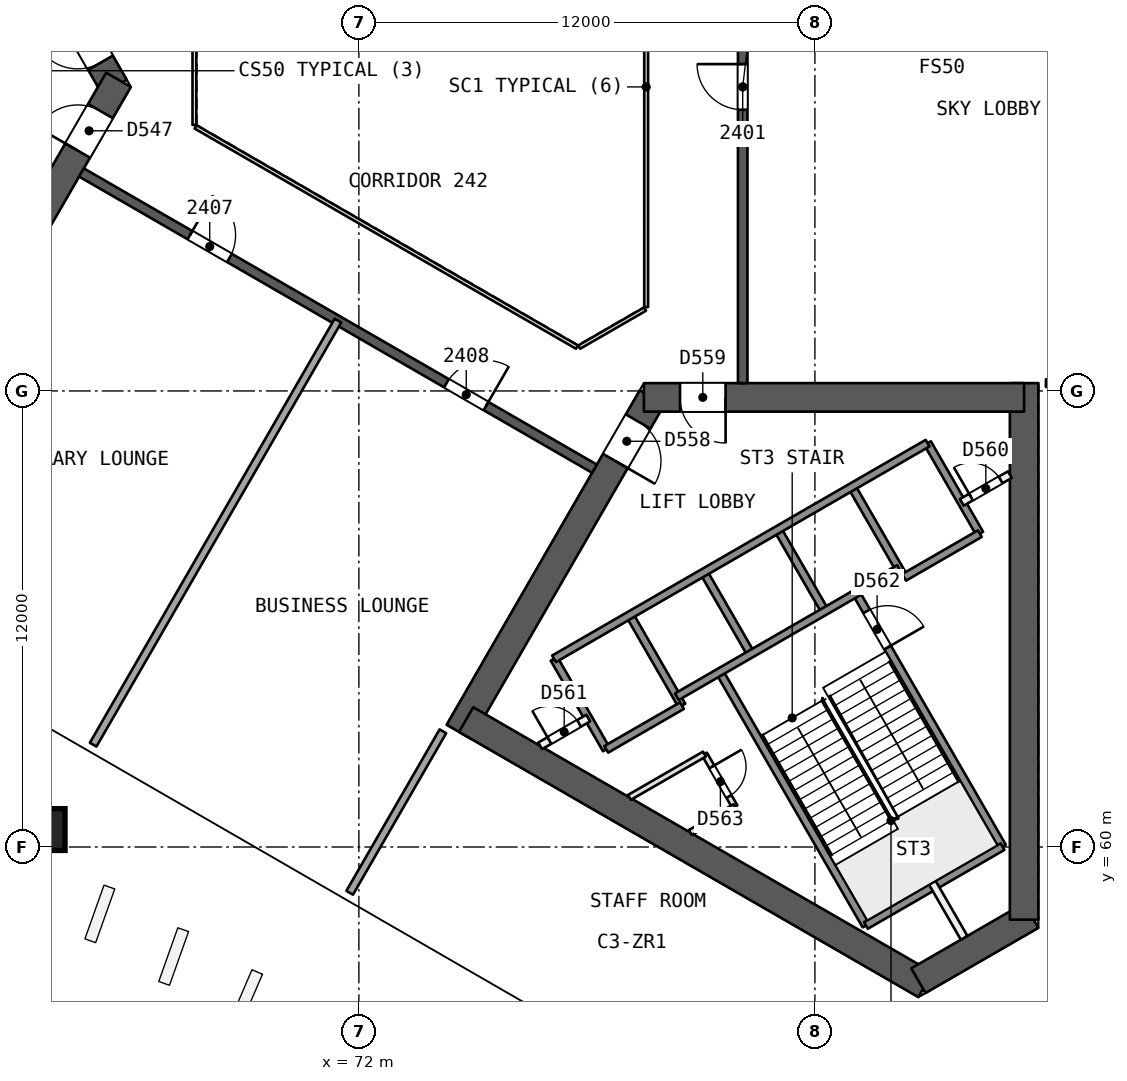
"""IFC4 building model, lengths in metres.
Left out: names, types, materials, properties, quantities, classifications, styles, units other than length and angle.
Written with IfcOpenShell. Run it as: python <this file> out.ifc"""

import sys

from ifc_helpers import new_model, si_unit, direction, frame, frame_2d, origin, origin_2d, place, context, subcontext, project, spatial, rectangle, extrude, element, fill, save


model = new_model("IFC4")
c1 = context("Model", 3, precision=1e-05, world=origin(), true_north=direction((0.0, 1.0)))
c2 = subcontext(c1, "Body", "Model", "MODEL_VIEW")
j1 = project(units=[si_unit("LENGTHUNIT", "METRE"), si_unit("PLANEANGLEUNIT", "RADIAN")], contexts=[c1])
p1 = place(None, origin())
s1 = spatial("IfcSite", under=j1, at=p1, CompositionType="ELEMENT")
p2 = place(p1, origin())
s2 = spatial("IfcBuilding", under=s1, at=p2, CompositionType="ELEMENT")
p3 = place(p2, frame((0.0, 0.0, 102.4)))
s3 = spatial("IfcBuildingStorey", under=s2, at=p3, CompositionType="ELEMENT", Elevation=102.4)
p4 = place(p3, frame((65.567, 80.0, 0.0), z_axis=(0.0, 0.0, 1.0), x_axis=(-0.499988615364, 0.866031976607, 0.0)))
e1 = element("IfcWall", 1, at=p4, inside=s3, PredefinedType="SHEAR", context=c2, shape_type="SweptSolid", body=[
    extrude(rectangle(XDim=10.163, YDim=0.75, at=frame_2d((5.082, 0.0))), origin(), (0.0, 0.0, 1.0), 4.4),
])
p5 = place(p4, frame((0.733, 0.0, 0.0)))
e2 = element("IfcOpeningElement", 2, at=p5, cuts=e1, PredefinedType="OPENING", context=c2, shape_type="SweptSolid", body=[
    extrude(rectangle(XDim=1.2, YDim=2.1, at=frame_2d((0.6, 1.05))), frame((0.0, 0.385, 0.0), z_axis=(0.0, -1.0, 0.0), x_axis=(1.0, 0.0, 0.0)), (0.0, 0.0, 1.0), 0.771),
])
p6 = place(p3, frame((60.673, 71.523, 0.0), z_axis=(0.0, 0.0, 1.0), x_axis=(0.499997052475, 0.866027105532, 0.0)))
e3 = element("IfcWall", 3, at=p6, inside=s3, PredefinedType="SHEAR", context=c2, shape_type="SweptSolid", body=[
    extrude(rectangle(XDim=10.005, YDim=0.75, at=frame_2d((5.002, 0.0))), origin(), (0.0, 0.0, 1.0), 4.4),
])
p7 = place(p6, frame((7.855, 0.0, 0.0)))
e4 = element("IfcOpeningElement", 4, at=p7, cuts=e3, PredefinedType="OPENING", context=c2, shape_type="SweptSolid", body=[
    extrude(rectangle(XDim=1.2, YDim=2.1, at=frame_2d((0.6, 1.05))), frame((0.0, 0.385, 0.0), z_axis=(0.0, -1.0, 0.0), x_axis=(1.0, 0.0, 0.0)), (0.0, 0.0, 1.0), 0.771),
])
p8 = place(p3, frame((79.717, 71.831, 0.0), z_axis=(0.0, 0.0, 1.0), x_axis=(-0.499996230114, -0.866027580318, 0.0)))
e5 = element("IfcWall", 5, at=p8, inside=s3, PredefinedType="SHEAR", context=c2, shape_type="SweptSolid", body=[
    extrude(rectangle(XDim=10.164, YDim=0.75, at=frame_2d((5.082, 0.0))), origin(), (0.0, 0.0, 1.0), 4.4),
])
p9 = place(p8, frame((0.733, 0.0, 0.0)))
e6 = element("IfcOpeningElement", 6, at=p9, cuts=e5, PredefinedType="OPENING", context=c2, shape_type="SweptSolid", body=[
    extrude(rectangle(XDim=1.2, YDim=2.1, at=frame_2d((0.6, 1.05))), frame((0.0, 0.385, 0.0), z_axis=(0.0, -1.0, 0.0), x_axis=(1.0, 0.0, 0.0)), (0.0, 0.0, 1.0), 0.771),
])
p10 = place(p3, frame((74.822, 63.354, 0.0), z_axis=(0.0, 0.0, 1.0), x_axis=(0.8660248072, -0.500001033313, 0.0)))
e7 = element("IfcWall", 7, at=p10, inside=s3, PredefinedType="SHEAR", context=c2, shape_type="SweptSolid", body=[
    extrude(rectangle(XDim=13.958, YDim=0.75, at=frame_2d((6.979, 0.0))), origin(), (0.0, 0.0, 1.0), 4.4),
])
p11 = place(p3, frame((86.723, 56.483, 0.0), z_axis=(0.0, 0.0, 1.0), x_axis=(0.866017201164, 0.500014207086, 0.0)))
e8 = element("IfcWall", 8, at=p11, inside=s3, PredefinedType="SHEAR", context=c2, shape_type="SweptSolid", body=[
    extrude(rectangle(XDim=3.429, YDim=0.75, at=frame_2d((1.714, 0.0))), origin(), (0.0, 0.0, 1.0), 4.4),
])
p12 = place(p3, frame((89.505, 58.089, 0.0), z_axis=(0.0, 0.0, 1.0), x_axis=(0.0, 1.0, 0.0)))
e9 = element("IfcWall", 9, at=p12, inside=s3, PredefinedType="SHEAR", context=c2, shape_type="SweptSolid", body=[
    extrude(rectangle(XDim=14.117, YDim=0.75, at=frame_2d((7.059, 0.0))), origin(), (0.0, 0.0, 1.0), 4.4),
])
p13 = place(p3, frame((89.505, 71.831, 0.0), z_axis=(0.0, 0.0, 1.0), x_axis=(-1.0, 0.0, 0.0)))
e10 = element("IfcWall", 10, at=p13, inside=s3, PredefinedType="SHEAR", context=c2, shape_type="SweptSolid", body=[
    extrude(rectangle(XDim=10.005, YDim=0.75, at=frame_2d((5.002, 0.0))), origin(), (0.0, 0.0, 1.0), 4.4),
])
p14 = place(p13, frame((7.855, 0.0, 0.0)))
e11 = element("IfcOpeningElement", 11, at=p14, cuts=e10, PredefinedType="OPENING", context=c2, shape_type="SweptSolid", body=[
    extrude(rectangle(XDim=1.2, YDim=2.1, at=frame_2d((0.6, 1.05))), frame((0.0, 0.385, 0.0), z_axis=(0.0, -1.0, 0.0), x_axis=(1.0, 0.0, 0.0)), (0.0, 0.0, 1.0), 0.771),
])
p15 = place(p3, frame((82.1, 72.206, 0.0), z_axis=(0.0, 0.0, 1.0), x_axis=(0.0, 1.0, 0.0)))
e12 = element("IfcWall", 12, at=p15, inside=s3, PredefinedType="SHEAR", context=c2, shape_type="SweptSolid", body=[
    extrude(rectangle(XDim=15.588, YDim=0.25, at=frame_2d((7.794, 0.0))), origin(), (0.0, 0.0, 1.0), 3.95),
])
p16 = place(p15, frame((7.194, 0.0, 0.0)))
e13 = element("IfcOpeningElement", 13, at=p16, cuts=e12, PredefinedType="OPENING", context=c2, shape_type="SweptSolid", body=[
    extrude(rectangle(XDim=1.2, YDim=2.4, at=frame_2d((0.6, 1.2))), frame((0.0, 0.135, 0.0), z_axis=(0.0, -1.0, 0.0), x_axis=(1.0, 0.0, 0.0)), (0.0, 0.0, 1.0), 0.271),
])
p17 = place(p3, frame((64.7, 77.748, 0.0), z_axis=(0.0, 0.0, 1.0), x_axis=(0.866026492143, -0.499998114903, 0.0)))
e14 = element("IfcWall", 14, at=p17, inside=s3, PredefinedType="SHEAR", context=c2, shape_type="SweptSolid", body=[
    extrude(rectangle(XDim=15.588, YDim=0.25, at=frame_2d((7.794, 0.0))), origin(), (0.0, 0.0, 1.0), 3.95),
])
p18 = place(p17, frame((3.297, 0.0, 0.0)))
e15 = element("IfcOpeningElement", 15, at=p18, cuts=e14, PredefinedType="OPENING", context=c2, shape_type="SweptSolid", body=[
    extrude(rectangle(XDim=1.2, YDim=2.4, at=frame_2d((0.6, 1.2))), frame((0.0, 0.135, 0.0), z_axis=(0.0, -1.0, 0.0), x_axis=(1.0, 0.0, 0.0)), (0.0, 0.0, 1.0), 0.271),
])
p19 = place(p17, frame((11.091, 0.0, 0.0)))
e16 = element("IfcOpeningElement", 16, at=p19, cuts=e14, PredefinedType="OPENING", context=c2, shape_type="SweptSolid", body=[
    extrude(rectangle(XDim=1.2, YDim=2.4, at=frame_2d((0.6, 1.2))), frame((0.0, 0.135, 0.0), z_axis=(0.0, -1.0, 0.0), x_axis=(1.0, 0.0, 0.0)), (0.0, 0.0, 1.0), 0.271),
])
p20 = place(p3, frame((63.706, 60.438, 0.0), z_axis=(0.010096151254, 0.017474107939, 0.999796340902), x_axis=(-0.500176845205, -0.865688077082, 0.020181098047)))
e17 = element("IfcColumn", 17, at=p20, inside=s3, PredefinedType="COLUMN", context=c2, shape_type="SweptSolid", body=[
    extrude(rectangle(XDim=1.1, YDim=1.1, at=origin_2d()), origin(), (0.0, 0.0, 1.0), 4.401),
])
p21 = place(p3, frame((94.984, 72.206, 0.0), z_axis=(0.0, 0.0, 1.0), x_axis=(-1.0, 0.0, 0.0)))
e18 = element("IfcWall", 18, at=p21, inside=s3, PredefinedType="PARTITIONING", context=c2, shape_type="SweptSolid", body=[
    extrude(rectangle(XDim=4.905, YDim=0.2, at=frame_2d((2.453, 0.0))), origin(), (0.0, 0.0, 1.0), 3.95),
])
p22 = place(p21, frame((1.9, 0.0, 0.0)))
e19 = element("IfcOpeningElement", 19, at=p22, cuts=e18, PredefinedType="OPENING", context=c2, shape_type="SweptSolid", body=[
    extrude(rectangle(XDim=1.2, YDim=2.4, at=frame_2d((0.6, 1.2))), frame((0.0, 0.11, 0.0), z_axis=(0.0, -1.0, 0.0), x_axis=(1.0, 0.0, 0.0)), (0.0, 0.0, 1.0), 0.221),
])
p23 = place(p3, frame((65.008, 62.693, 0.0), z_axis=(0.0, 0.0, 1.0), x_axis=(0.499996920331, 0.866027181825, 0.0)))
e20 = element("IfcWall", 20, at=p23, inside=s3, PredefinedType="PARTITIONING", context=c2, shape_type="SweptSolid", body=[
    extrude(rectangle(XDim=12.884, YDim=0.2, at=frame_2d((6.442, 0.0))), origin(), (0.0, 0.0, 1.0), 3.95),
])
p24 = place(p3, frame((74.21, 63.044, 0.0), z_axis=(0.0, 0.0, 1.0), x_axis=(-0.499982380289, -0.86603557629, 0.0)))
e21 = element("IfcWall", 21, at=p24, inside=s3, PredefinedType="PARTITIONING", context=c2, shape_type="SweptSolid", body=[
    extrude(rectangle(XDim=4.906, YDim=0.2, at=frame_2d((2.453, 0.0))), origin(), (0.0, 0.0, 1.0), 3.95),
])
p25 = place(p3, frame((77.135, 64.952, 0.0), z_axis=(0.0, 0.0, 1.0), x_axis=(0.499996545922, -0.866027397988, 0.0)))
e22 = element("IfcWall", 22, at=p25, inside=s3, PredefinedType="SOLIDWALL", context=c2, shape_type="SweptSolid", body=[
    extrude(rectangle(XDim=2.75, YDim=0.2, at=frame_2d((1.375, 0.0))), origin(), (0.0, 0.0, 1.0), 3.95),
])
p26 = place(p3, frame((81.094, 62.445, 0.0), z_axis=(0.0, 0.0, 1.0), x_axis=(0.499880961361, -0.866094119867, 0.0)))
e23 = element("IfcWall", 23, at=p26, inside=s3, PredefinedType="PARTITIONING", context=c2, shape_type="SweptSolid", body=[
    extrude(rectangle(XDim=1.6, YDim=0.15, at=frame_2d((0.8, 0.0))), origin(), (0.0, 0.0, 1.0), 3.95),
])
p27 = place(p26, frame((0.387, 0.0, 0.0)))
e24 = element("IfcOpeningElement", 24, at=p27, cuts=e23, PredefinedType="OPENING", context=c2, shape_type="SweptSolid", body=[
    extrude(rectangle(XDim=0.9, YDim=2.1, at=frame_2d((0.45, 1.05))), frame((0.0, 0.085, 0.0), z_axis=(0.0, -1.0, 0.0), x_axis=(1.0, 0.0, 0.0)), (0.0, 0.0, 1.0), 0.171),
])
p28 = place(p3, frame((79.127, 66.102, 0.0), z_axis=(0.0, 0.0, 1.0), x_axis=(0.499996545922, -0.866027397988, 0.0)))
e25 = element("IfcWall", 25, at=p28, inside=s3, PredefinedType="SOLIDWALL", context=c2, shape_type="SweptSolid", body=[
    extrude(rectangle(XDim=2.75, YDim=0.2, at=frame_2d((1.375, 0.0))), origin(), (0.0, 0.0, 1.0), 3.95),
])
p29 = place(p3, frame((81.493, 64.604, 0.0), z_axis=(0.0, 0.0, 1.0), x_axis=(0.500006057782, -0.866021906294, 0.0)))
e26 = element("IfcWall", 26, at=p29, inside=s3, PredefinedType="SOLIDWALL", context=c2, shape_type="SweptSolid", body=[
    extrude(rectangle(XDim=7.7, YDim=0.2, at=frame_2d((3.85, 0.0))), origin(), (0.0, 0.0, 1.0), 3.95),
])
p30 = place(p3, frame((81.076, 67.227, 0.0), z_axis=(0.0, 0.0, 1.0), x_axis=(0.50000366821, -0.866023285932, 0.0)))
e27 = element("IfcWall", 27, at=p30, inside=s3, PredefinedType="SOLIDWALL", context=c2, shape_type="SweptSolid", body=[
    extrude(rectangle(XDim=2.48, YDim=0.2, at=frame_2d((1.24, 0.0))), origin(), (0.0, 0.0, 1.0), 3.95),
])
p31 = place(p3, frame((87.09, 59.06, 0.0), z_axis=(0.0, 0.0, 1.0), x_axis=(0.499937194881, -0.866061661301, 0.0)))
e28 = element("IfcWall", 28, at=p31, inside=s3, PredefinedType="PARTITIONING", context=c2, shape_type="SweptSolid", body=[
    extrude(rectangle(XDim=1.673, YDim=0.2, at=frame_2d((0.836, 0.0))), origin(), (0.0, 0.0, 1.0), 3.95),
])
p32 = place(p3, frame((83.024, 68.352, 0.0), z_axis=(0.0, 0.0, 1.0), x_axis=(0.50000366821, -0.866023285932, 0.0)))
e29 = element("IfcWall", 29, at=p32, inside=s3, PredefinedType="SOLIDWALL", context=c2, shape_type="SweptSolid", body=[
    extrude(rectangle(XDim=2.48, YDim=0.2, at=frame_2d((1.24, 0.0))), origin(), (0.0, 0.0, 1.0), 3.95),
])
p33 = place(p3, frame((85.087, 66.679, 0.0), z_axis=(0.0, 0.0, 1.0), x_axis=(0.500019787375, -0.866013979237, 0.0)))
e30 = element("IfcWall", 30, at=p33, inside=s3, PredefinedType="SOLIDWALL", context=c2, shape_type="SweptSolid", body=[
    extrude(rectangle(XDim=7.7, YDim=0.2, at=frame_2d((3.85, 0.0))), origin(), (0.0, 0.0, 1.0), 3.95),
])
p34 = place(p33, frame((0.55, 0.0, 0.0)))
e31 = element("IfcOpeningElement", 31, at=p34, cuts=e30, PredefinedType="OPENING", context=c2, shape_type="SweptSolid", body=[
    extrude(rectangle(XDim=1.1, YDim=2.1, at=frame_2d((0.55, 1.05))), frame((0.0, 0.11, 0.0), z_axis=(0.0, -1.0, 0.0), x_axis=(1.0, 0.0, 0.0)), (0.0, 0.0, 1.0), 0.221),
])
for number, where, z_axis, x_axis in (
    (32, (84.973, 69.477, 0.0), (0.0, 0.0, 1.0), (0.5, -0.866, 0.0)),
    (33, (86.965, 70.626, 0.0), (0.0, 0.0, 1.0), (0.5, -0.866, 0.0)),
):
    element("IfcWall", number, at=place(p3, frame(where, z_axis=z_axis, x_axis=x_axis)), inside=s3, PredefinedType="SOLIDWALL", context=c2, shape_type="SweptSolid", body=[
        extrude(rectangle(XDim=2.75, YDim=0.2, at=frame_2d((1.375, 0.0))), origin(), (0.0, 0.0, 1.0), 3.95),
    ])
p35 = place(p3, frame((77.135, 64.952, 0.0), z_axis=(0.0, 0.0, 1.0), x_axis=(0.866031916153, 0.499988720078, 0.0)))
e34 = element("IfcWall", 34, at=p35, inside=s3, PredefinedType="SOLIDWALL", context=c2, shape_type="SweptSolid", body=[
    extrude(rectangle(XDim=11.35, YDim=0.2, at=frame_2d((5.675, 0.0))), origin(), (0.0, 0.0, 1.0), 3.95),
])
p36 = place(p3, frame((76.77, 62.662, 0.0), z_axis=(0.0, 0.0, 1.0), x_axis=(0.866054810376, 0.49994906283, 0.0)))
e35 = element("IfcWall", 35, at=p36, inside=s3, PredefinedType="PARTITIONING", context=c2, shape_type="SweptSolid", body=[
    extrude(rectangle(XDim=1.461, YDim=0.2, at=frame_2d((0.73, 0.0))), origin(), (0.0, 0.0, 1.0), 3.95),
])
p37 = place(p36, frame((0.281, 0.0, 0.0)))
e36 = element("IfcOpeningElement", 36, at=p37, cuts=e35, PredefinedType="OPENING", context=c2, shape_type="SweptSolid", body=[
    extrude(rectangle(XDim=0.9, YDim=2.1, at=frame_2d((0.45, 1.05))), frame((0.0, 0.11, 0.0), z_axis=(0.0, -1.0, 0.0), x_axis=(1.0, 0.0, 0.0)), (0.0, 0.0, 1.0), 0.221),
])
p38 = place(p3, frame((87.865, 69.068, 0.0), z_axis=(0.0, 0.0, 1.0), x_axis=(0.865982457891, 0.500074377092, 0.0)))
e37 = element("IfcWall", 37, at=p38, inside=s3, PredefinedType="PARTITIONING", context=c2, shape_type="SweptSolid", body=[
    extrude(rectangle(XDim=1.461, YDim=0.2, at=frame_2d((0.73, 0.0))), origin(), (0.0, 0.0, 1.0), 3.95),
])
p39 = place(p38, frame((0.281, 0.0, 0.0)))
e38 = element("IfcOpeningElement", 38, at=p39, cuts=e37, PredefinedType="OPENING", context=c2, shape_type="SweptSolid", body=[
    extrude(rectangle(XDim=0.9, YDim=2.1, at=frame_2d((0.45, 1.05))), frame((0.0, 0.11, 0.0), z_axis=(0.0, -1.0, 0.0), x_axis=(1.0, 0.0, 0.0)), (0.0, 0.0, 1.0), 0.221),
])
p40 = place(p3, frame((80.367, 63.954, 0.0), z_axis=(0.0, 0.0, 1.0), x_axis=(0.866026575979, 0.499997969693, 0.0)))
e39 = element("IfcWall", 39, at=p40, inside=s3, PredefinedType="SOLIDWALL", context=c2, shape_type="SweptSolid", body=[
    extrude(rectangle(XDim=6.75, YDim=0.2, at=frame_2d((3.375, 0.0))), origin(), (0.0, 0.0, 1.0), 3.95),
])
p41 = place(p3, frame((78.51, 62.57, 0.0), z_axis=(0.0, 0.0, 1.0), x_axis=(0.866053019151, 0.499952165731, 0.0)))
e40 = element("IfcWall", 40, at=p41, inside=s3, PredefinedType="SOLIDWALL", context=c2, shape_type="SweptSolid", body=[
    extrude(rectangle(XDim=2.3, YDim=0.2, at=frame_2d((1.15, 0.0))), origin(), (0.0, 0.0, 1.0), 3.95),
])
p42 = place(p3, frame((86.348, 67.095, 0.0), z_axis=(0.0, 0.0, 1.0), x_axis=(0.86602648383, 0.499998129301, 0.0)))
e41 = element("IfcWall", 41, at=p42, inside=s3, PredefinedType="SOLIDWALL", context=c2, shape_type="SweptSolid", body=[
    extrude(rectangle(XDim=2.3, YDim=0.2, at=frame_2d((1.15, 0.0))), origin(), (0.0, 0.0, 1.0), 3.95),
])
p43 = place(p3, frame((79.12, 61.305, 0.0), z_axis=(0.0, 0.0, 1.0), x_axis=(0.866046471269, 0.499963508271, 0.0)))
e42 = element("IfcWall", 42, at=p43, inside=s3, PredefinedType="PARTITIONING", context=c2, shape_type="SweptSolid", body=[
    extrude(rectangle(XDim=2.28, YDim=0.15, at=frame_2d((1.14, 0.0))), origin(), (0.0, 0.0, 1.0), 3.95),
])
p44 = place(p3, frame((80.72, 60.382, 0.0), z_axis=(0.0, 0.0, 1.0), x_axis=(0.866017611601, 0.500013496215, 0.0)))
e43 = element("IfcWall", 43, at=p44, inside=s3, PredefinedType="PARTITIONING", context=c2, shape_type="SweptSolid", body=[
    extrude(rectangle(XDim=1.355, YDim=0.15, at=frame_2d((0.678, 0.0))), origin(), (0.0, 0.0, 1.0), 3.95),
])
p45 = place(p3, frame((85.343, 57.935, 0.0), z_axis=(0.0, 0.0, 1.0), x_axis=(0.866004344652, 0.500036473714, 0.0)))
e44 = element("IfcWall", 44, at=p45, inside=s3, PredefinedType="SOLIDWALL", context=c2, shape_type="SweptSolid", body=[
    extrude(rectangle(XDim=4.15, YDim=0.2, at=frame_2d((2.075, 0.0))), origin(), (0.0, 0.0, 1.0), 3.95),
])
p46 = place(p3, frame((79.56, 74.206, 0.0), z_axis=(0.0, 0.0, 1.0), x_axis=(0.0, 1.0, 0.0)))
e45 = element("IfcWall", 45, at=p46, inside=s3, PredefinedType="PARTITIONING", context=c2, shape_type="SweptSolid", body=[
    extrude(rectangle(XDim=11.588, YDim=0.1, at=frame_2d((5.794, 0.0))), origin(), (0.0, 0.0, 1.0), 3.95),
])
p47 = place(p3, frame((67.672, 81.0, 0.0), z_axis=(0.0, 0.0, 1.0), x_axis=(0.0, -1.0, 0.0)))
e46 = element("IfcWall", 46, at=p47, inside=s3, PredefinedType="PARTITIONING", context=c2, shape_type="SweptSolid", body=[
    extrude(rectangle(XDim=2.0, YDim=0.1, at=frame_2d((1.0, 0.0))), origin(), (0.0, 0.0, 1.0), 3.95),
])
p48 = place(p3, frame((67.702, 78.948, 0.0), z_axis=(0.0, 0.0, 1.0), x_axis=(0.866026658274, -0.499997827154, 0.0)))
e47 = element("IfcWall", 47, at=p48, inside=s3, PredefinedType="PARTITIONING", context=c2, shape_type="SweptSolid", body=[
    extrude(rectangle(XDim=11.588, YDim=0.1, at=frame_2d((5.794, 0.0))), origin(), (0.0, 0.0, 1.0), 3.95),
])
p49 = place(p3, frame((77.798, 73.154, 0.0), z_axis=(0.0, 0.0, 1.0), x_axis=(0.866041268327, 0.499972520799, 0.0)))
e48 = element("IfcWall", 48, at=p49, inside=s3, PredefinedType="PARTITIONING", context=c2, shape_type="SweptSolid", body=[
    extrude(rectangle(XDim=2.0, YDim=0.1, at=frame_2d((1.0, 0.0))), origin(), (0.0, 0.0, 1.0), 3.95),
])
p50 = place(p16, origin())
e49 = element("IfcDoor", 49, at=p50, inside=s3, OperationType="SINGLE_SWING_RIGHT", PredefinedType="NOTDEFINED", context=c2, shape_type="SweptSolid", body=[
    extrude(rectangle(XDim=1.2, YDim=2.4, at=frame_2d((0.6, 1.2))), frame((0.0, 0.025, 0.0), z_axis=(0.0, -1.0, 0.0), x_axis=(1.0, 0.0, 0.0)), (0.0, 0.0, 1.0), 0.05),
])
fill(e13, e49)
p51 = place(p18, origin())
e50 = element("IfcDoor", 50, at=p51, inside=s3, OperationType="SINGLE_SWING_LEFT", PredefinedType="NOTDEFINED", context=c2, shape_type="SweptSolid", body=[
    extrude(rectangle(XDim=1.2, YDim=2.4, at=frame_2d((0.6, 1.2))), frame((0.0, 0.025, 0.0), z_axis=(0.0, -1.0, 0.0), x_axis=(1.0, 0.0, 0.0)), (0.0, 0.0, 1.0), 0.05),
])
fill(e15, e50)
p52 = place(p19, origin())
e51 = element("IfcDoor", 51, at=p52, inside=s3, OperationType="SINGLE_SWING_RIGHT", PredefinedType="NOTDEFINED", context=c2, shape_type="SweptSolid", body=[
    extrude(rectangle(XDim=1.2, YDim=2.4, at=frame_2d((0.6, 1.2))), frame((0.0, 0.025, 0.0), z_axis=(0.0, -1.0, 0.0), x_axis=(1.0, 0.0, 0.0)), (0.0, 0.0, 1.0), 0.05),
])
fill(e16, e51)
p53 = place(p5, origin())
e52 = element("IfcDoor", 52, at=p53, inside=s3, OperationType="SINGLE_SWING_RIGHT", PredefinedType="NOTDEFINED", context=c2, shape_type="SweptSolid", body=[
    extrude(rectangle(XDim=1.2, YDim=2.1, at=frame_2d((0.6, 1.05))), frame((0.0, 0.025, 0.0), z_axis=(0.0, -1.0, 0.0), x_axis=(1.0, 0.0, 0.0)), (0.0, 0.0, 1.0), 0.05),
])
fill(e2, e52)
p54 = place(p7, origin())
e53 = element("IfcDoor", 53, at=p54, inside=s3, OperationType="SINGLE_SWING_LEFT", PredefinedType="NOTDEFINED", context=c2, shape_type="SweptSolid", body=[
    extrude(rectangle(XDim=1.2, YDim=2.1, at=frame_2d((0.6, 1.05))), frame((0.0, 0.025, 0.0), z_axis=(0.0, -1.0, 0.0), x_axis=(1.0, 0.0, 0.0)), (0.0, 0.0, 1.0), 0.05),
])
fill(e4, e53)
p55 = place(p9, origin())
e54 = element("IfcDoor", 54, at=p55, inside=s3, OperationType="SINGLE_SWING_RIGHT", PredefinedType="NOTDEFINED", context=c2, shape_type="SweptSolid", body=[
    extrude(rectangle(XDim=1.2, YDim=2.1, at=frame_2d((0.6, 1.05))), frame((0.0, 0.025, 0.0), z_axis=(0.0, -1.0, 0.0), x_axis=(1.0, 0.0, 0.0)), (0.0, 0.0, 1.0), 0.05),
])
fill(e6, e54)
p56 = place(p14, origin())
e55 = element("IfcDoor", 55, at=p56, inside=s3, OperationType="SINGLE_SWING_LEFT", PredefinedType="NOTDEFINED", context=c2, shape_type="SweptSolid", body=[
    extrude(rectangle(XDim=1.2, YDim=2.1, at=frame_2d((0.6, 1.05))), frame((0.0, 0.025, 0.0), z_axis=(0.0, -1.0, 0.0), x_axis=(1.0, 0.0, 0.0)), (0.0, 0.0, 1.0), 0.05),
])
fill(e11, e55)
p57 = place(p39, origin())
e56 = element("IfcDoor", 56, at=p57, inside=s3, OperationType="SINGLE_SWING_LEFT", PredefinedType="NOTDEFINED", context=c2, shape_type="SweptSolid", body=[
    extrude(rectangle(XDim=0.9, YDim=2.1, at=frame_2d((0.45, 1.05))), frame((0.0, 0.025, 0.0), z_axis=(0.0, -1.0, 0.0), x_axis=(1.0, 0.0, 0.0)), (0.0, 0.0, 1.0), 0.05),
])
fill(e38, e56)
p58 = place(p37, origin())
e57 = element("IfcDoor", 57, at=p58, inside=s3, OperationType="SINGLE_SWING_LEFT", PredefinedType="NOTDEFINED", context=c2, shape_type="SweptSolid", body=[
    extrude(rectangle(XDim=0.9, YDim=2.1, at=frame_2d((0.45, 1.05))), frame((0.0, 0.025, 0.0), z_axis=(0.0, -1.0, 0.0), x_axis=(1.0, 0.0, 0.0)), (0.0, 0.0, 1.0), 0.05),
])
fill(e36, e57)
p59 = place(p34, origin())
e58 = element("IfcDoor", 58, at=p59, inside=s3, OperationType="SINGLE_SWING_RIGHT", PredefinedType="NOTDEFINED", context=c2, shape_type="SweptSolid", body=[
    extrude(rectangle(XDim=1.1, YDim=2.1, at=frame_2d((0.55, 1.05))), frame((0.0, 0.025, 0.0), z_axis=(0.0, -1.0, 0.0), x_axis=(1.0, 0.0, 0.0)), (0.0, 0.0, 1.0), 0.05),
])
fill(e31, e58)
p60 = place(p27, origin())
e59 = element("IfcDoor", 59, at=p60, inside=s3, OperationType="SINGLE_SWING_LEFT", PredefinedType="NOTDEFINED", context=c2, shape_type="SweptSolid", body=[
    extrude(rectangle(XDim=0.9, YDim=2.1, at=frame_2d((0.45, 1.05))), frame((0.0, 0.025, 0.0), z_axis=(0.0, -1.0, 0.0), x_axis=(1.0, 0.0, 0.0)), (0.0, 0.0, 1.0), 0.05),
])
fill(e24, e59)
save(model, sys.argv[1])
